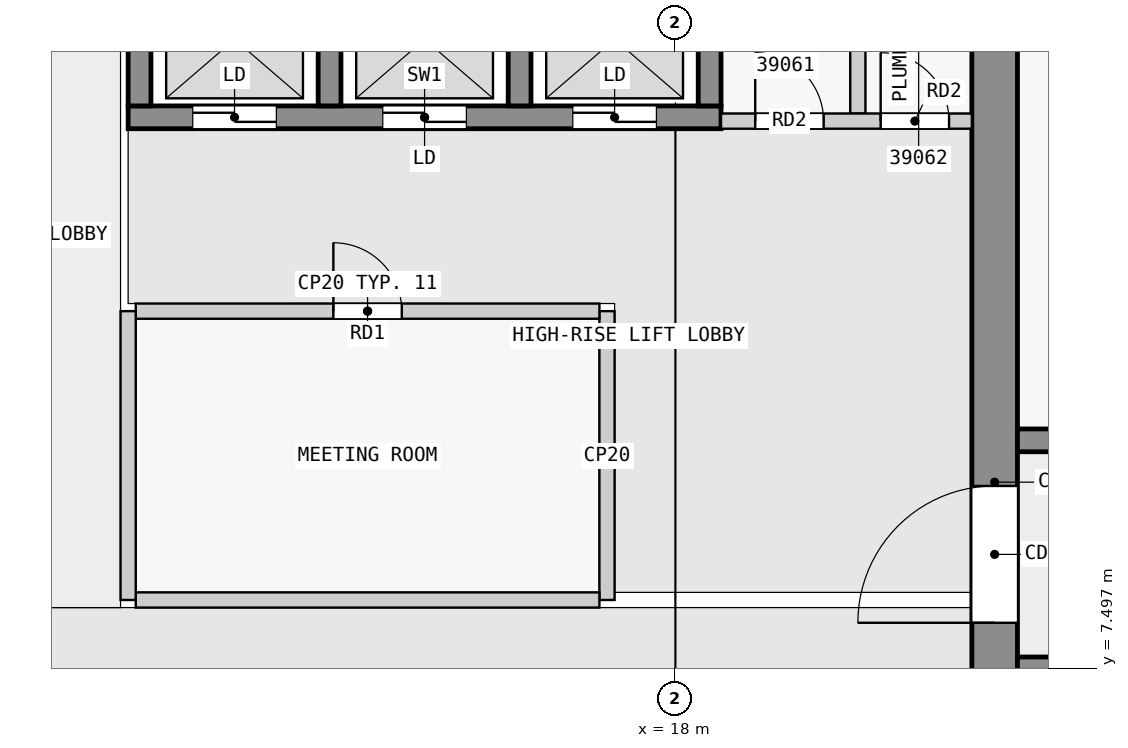
"""IFC4 building model, lengths in metres.
Left out: names, types, materials, properties, quantities, classifications, styles, units other than length and angle.
Written with IfcOpenShell. Run it as: python <this file> out.ifc"""

import sys

from ifc_helpers import new_model, si_unit, direction, frame, frame_2d, origin, place, context, subcontext, project, spatial, rectangle, extrude, element, fill, save


model = new_model("IFC4")
c1 = context("Model", 3, precision=1e-05, world=origin(), true_north=direction((0.0, 1.0)))
c2 = subcontext(c1, "Body", "Model", "MODEL_VIEW")
j1 = project(units=[si_unit("LENGTHUNIT", "METRE"), si_unit("PLANEANGLEUNIT", "RADIAN")], contexts=[c1])
p1 = place(None, origin())
s1 = spatial("IfcSite", under=j1, at=p1, CompositionType="ELEMENT")
p2 = place(p1, origin())
s2 = spatial("IfcBuilding", under=s1, at=p2, CompositionType="ELEMENT")
p3 = place(p2, frame((0.0, 0.0, 153.4)))
s3 = spatial("IfcBuildingStorey", under=s2, at=p3, CompositionType="ELEMENT", Elevation=153.4)
p4 = place(p3, frame((22.2, 2.5, 0.0), z_axis=(0.0, 0.0, 1.0), x_axis=(0.0, 1.0, 0.0)))
e1 = element("IfcWall", 1, at=p4, inside=s3, PredefinedType="SHEAR", context=c2, shape_type="SweptSolid", body=[
    extrude(rectangle(XDim=14.9, YDim=0.6, at=frame_2d((7.45, 0.0))), origin(), (0.0, 0.0, 1.0), 3.25),
])
p5 = place(p4, frame((5.6, 0.0, 0.0)))
e2 = element("IfcOpeningElement", 2, at=p5, cuts=e1, PredefinedType="OPENING", context=c2, shape_type="SweptSolid", body=[
    extrude(rectangle(XDim=1.8, YDim=2.1, at=frame_2d((0.9, 1.05))), frame((0.0, 0.31, 0.0), z_axis=(0.0, -1.0, 0.0), x_axis=(1.0, 0.0, 0.0)), (0.0, 0.0, 1.0), 0.62),
])
p6 = place(p3, frame((10.8, 14.75, 0.0), z_axis=(0.0, 0.0, 1.0), x_axis=(1.0, 0.0, 0.0)))
e3 = element("IfcWall", 3, at=p6, inside=s3, PredefinedType="SHEAR", context=c2, shape_type="SweptSolid", body=[
    extrude(rectangle(XDim=7.8, YDim=0.3, at=frame_2d((3.9, 0.0))), origin(), (0.0, 0.0, 1.0), 3.25),
])
p7 = place(p6, frame((0.85, 0.0, 0.0)))
e4 = element("IfcOpeningElement", 4, at=p7, cuts=e3, PredefinedType="OPENING", context=c2, shape_type="SweptSolid", body=[
    extrude(rectangle(XDim=1.1, YDim=2.1, at=frame_2d((0.55, 1.05))), frame((0.0, 0.16, 0.0), z_axis=(0.0, -1.0, 0.0), x_axis=(1.0, 0.0, 0.0)), (0.0, 0.0, 1.0), 0.32),
])
p8 = place(p6, frame((3.35, 0.0, 0.0)))
e5 = element("IfcOpeningElement", 5, at=p8, cuts=e3, PredefinedType="OPENING", context=c2, shape_type="SweptSolid", body=[
    extrude(rectangle(XDim=1.1, YDim=2.1, at=frame_2d((0.55, 1.05))), frame((0.0, 0.16, 0.0), z_axis=(0.0, -1.0, 0.0), x_axis=(1.0, 0.0, 0.0)), (0.0, 0.0, 1.0), 0.32),
])
p9 = place(p6, frame((5.85, 0.0, 0.0)))
e6 = element("IfcOpeningElement", 6, at=p9, cuts=e3, PredefinedType="OPENING", context=c2, shape_type="SweptSolid", body=[
    extrude(rectangle(XDim=1.1, YDim=2.1, at=frame_2d((0.55, 1.05))), frame((0.0, 0.16, 0.0), z_axis=(0.0, -1.0, 0.0), x_axis=(1.0, 0.0, 0.0)), (0.0, 0.0, 1.0), 0.32),
])
for number, where, z_axis, x_axis in (
    (7, (10.95, 14.9, 0.0), (0.0, 0.0, 1.0), (0.0, 1.0, 0.0)),
    (8, (13.45, 14.9, 0.0), (0.0, 0.0, 1.0), (0.0, 1.0, 0.0)),
    (9, (15.95, 14.9, 0.0), (0.0, 0.0, 1.0), (0.0, 1.0, 0.0)),
    (10, (18.45, 14.9, 0.0), (0.0, 0.0, 1.0), (0.0, 1.0, 0.0)),
):
    element("IfcWall", number, at=place(p3, frame(where, z_axis=z_axis, x_axis=x_axis)), inside=s3, PredefinedType="SHEAR", context=c2, shape_type="SweptSolid", body=[
        extrude(rectangle(XDim=2.0, YDim=0.3, at=frame_2d((1.0, 0.0))), origin(), (0.0, 0.0, 1.0), 3.25),
    ])
p10 = place(p3, frame((22.5, 7.5, 0.0), z_axis=(0.0, 0.0, 1.0), x_axis=(1.0, 0.0, 0.0)))
e11 = element("IfcWall", 11, at=p10, inside=s3, PredefinedType="SHEAR", context=c2, shape_type="SweptSolid", body=[
    extrude(rectangle(XDim=22.5, YDim=0.3, at=frame_2d((11.25, 0.0))), origin(), (0.0, 0.0, 1.0), 3.25),
])
p11 = place(p10, frame((4.05, 0.0, 0.0)))
e12 = element("IfcOpeningElement", 12, at=p11, cuts=e11, PredefinedType="OPENING", context=c2, shape_type="SweptSolid", body=[
    extrude(rectangle(XDim=1.0, YDim=2.1, at=frame_2d((0.5, 1.05))), frame((0.0, 0.16, 0.0), z_axis=(0.0, -1.0, 0.0), x_axis=(1.0, 0.0, 0.0)), (0.0, 0.0, 1.0), 0.32),
])
p12 = place(p10, frame((10.35, 0.0, 0.0)))
e13 = element("IfcOpeningElement", 13, at=p12, cuts=e11, PredefinedType="OPENING", context=c2, shape_type="SweptSolid", body=[
    extrude(rectangle(XDim=1.8, YDim=2.1, at=frame_2d((0.9, 1.05))), frame((0.0, 0.16, 0.0), z_axis=(0.0, -1.0, 0.0), x_axis=(1.0, 0.0, 0.0)), (0.0, 0.0, 1.0), 0.32),
])
p13 = place(p10, frame((16.85, 0.0, 0.0)))
e14 = element("IfcOpeningElement", 14, at=p13, cuts=e11, PredefinedType="OPENING", context=c2, shape_type="SweptSolid", body=[
    extrude(rectangle(XDim=1.0, YDim=2.1, at=frame_2d((0.5, 1.05))), frame((0.0, 0.16, 0.0), z_axis=(0.0, -1.0, 0.0), x_axis=(1.0, 0.0, 0.0)), (0.0, 0.0, 1.0), 0.32),
])
p14 = place(p3, frame((22.5, 10.5, 0.0), z_axis=(0.0, 0.0, 1.0), x_axis=(1.0, 0.0, 0.0)))
e15 = element("IfcWall", 15, at=p14, inside=s3, PredefinedType="SHEAR", context=c2, shape_type="SweptSolid", body=[
    extrude(rectangle(XDim=22.5, YDim=0.3, at=frame_2d((11.25, 0.0))), origin(), (0.0, 0.0, 1.0), 3.25),
])
p15 = place(p14, frame((4.05, 0.0, 0.0)))
e16 = element("IfcOpeningElement", 16, at=p15, cuts=e15, PredefinedType="OPENING", context=c2, shape_type="SweptSolid", body=[
    extrude(rectangle(XDim=1.0, YDim=2.1, at=frame_2d((0.5, 1.05))), frame((0.0, 0.16, 0.0), z_axis=(0.0, -1.0, 0.0), x_axis=(1.0, 0.0, 0.0)), (0.0, 0.0, 1.0), 0.32),
])
p16 = place(p14, frame((11.65, 0.0, 0.0)))
e17 = element("IfcOpeningElement", 17, at=p16, cuts=e15, PredefinedType="OPENING", context=c2, shape_type="SweptSolid", body=[
    extrude(rectangle(XDim=1.0, YDim=2.1, at=frame_2d((0.5, 1.05))), frame((0.0, 0.16, 0.0), z_axis=(0.0, -1.0, 0.0), x_axis=(1.0, 0.0, 0.0)), (0.0, 0.0, 1.0), 0.32),
])
p17 = place(p14, frame((18.75, 0.0, 0.0)))
e18 = element("IfcOpeningElement", 18, at=p17, cuts=e15, PredefinedType="OPENING", context=c2, shape_type="SweptSolid", body=[
    extrude(rectangle(XDim=0.9, YDim=2.1, at=frame_2d((0.45, 1.05))), frame((0.0, 0.16, 0.0), z_axis=(0.0, -1.0, 0.0), x_axis=(1.0, 0.0, 0.0)), (0.0, 0.0, 1.0), 0.32),
])
p18 = place(p14, frame((20.95, 0.0, 0.0)))
e19 = element("IfcOpeningElement", 19, at=p18, cuts=e15, PredefinedType="OPENING", context=c2, shape_type="SweptSolid", body=[
    extrude(rectangle(XDim=1.0, YDim=2.1, at=frame_2d((0.5, 1.05))), frame((0.0, 0.16, 0.0), z_axis=(0.0, -1.0, 0.0), x_axis=(1.0, 0.0, 0.0)), (0.0, 0.0, 1.0), 0.32),
])
p19 = place(p3, frame((10.8, 8.4, 0.0), z_axis=(0.0, 0.0, 1.0), x_axis=(0.0, 1.0, 0.0)))
e20 = element("IfcWall", 20, at=p19, inside=s3, PredefinedType="PARTITIONING", context=c2, shape_type="SweptSolid", body=[
    extrude(rectangle(XDim=3.8, YDim=0.2, at=frame_2d((1.9, 0.0))), origin(), (0.0, 0.0, 1.0), 3.25),
])
p20 = place(p3, frame((10.9, 8.4, 0.0), z_axis=(0.0, 0.0, 1.0), x_axis=(1.0, 0.0, 0.0)))
e21 = element("IfcWall", 21, at=p20, inside=s3, PredefinedType="PARTITIONING", context=c2, shape_type="SweptSolid", body=[
    extrude(rectangle(XDim=6.1, YDim=0.2, at=frame_2d((3.05, 0.0))), origin(), (0.0, 0.0, 1.0), 3.25),
])
p21 = place(p3, frame((17.1, 8.4, 0.0), z_axis=(0.0, 0.0, 1.0), x_axis=(0.0, 1.0, 0.0)))
e22 = element("IfcWall", 22, at=p21, inside=s3, PredefinedType="PARTITIONING", context=c2, shape_type="SweptSolid", body=[
    extrude(rectangle(XDim=3.8, YDim=0.2, at=frame_2d((1.9, 0.0))), origin(), (0.0, 0.0, 1.0), 3.25),
])
p22 = place(p3, frame((10.9, 12.2, 0.0), z_axis=(0.0, 0.0, 1.0), x_axis=(1.0, 0.0, 0.0)))
e23 = element("IfcWall", 23, at=p22, inside=s3, PredefinedType="PARTITIONING", context=c2, shape_type="SweptSolid", body=[
    extrude(rectangle(XDim=6.1, YDim=0.2, at=frame_2d((3.05, 0.0))), origin(), (0.0, 0.0, 1.0), 3.25),
])
p23 = place(p22, frame((2.6, 0.0, 0.0)))
e24 = element("IfcOpeningElement", 24, at=p23, cuts=e23, PredefinedType="OPENING", context=c2, shape_type="SweptSolid", body=[
    extrude(rectangle(XDim=0.9, YDim=2.1, at=frame_2d((0.45, 1.05))), frame((0.0, 0.11, 0.0), z_axis=(0.0, -1.0, 0.0), x_axis=(1.0, 0.0, 0.0)), (0.0, 0.0, 1.0), 0.22),
])
p24 = place(p3, frame((18.6, 14.7, 0.0), z_axis=(0.0, 0.0, 1.0), x_axis=(1.0, 0.0, 0.0)))
e25 = element("IfcWall", 25, at=p24, inside=s3, PredefinedType="PARTITIONING", context=c2, shape_type="SweptSolid", body=[
    extrude(rectangle(XDim=3.3, YDim=0.2, at=frame_2d((1.65, 0.0))), origin(), (0.0, 0.0, 1.0), 3.25),
])
p25 = place(p24, frame((0.45, 0.0, 0.0)))
e26 = element("IfcOpeningElement", 26, at=p25, cuts=e25, PredefinedType="OPENING", context=c2, shape_type="SweptSolid", body=[
    extrude(rectangle(XDim=0.9, YDim=2.1, at=frame_2d((0.45, 1.05))), frame((0.0, 0.11, 0.0), z_axis=(0.0, -1.0, 0.0), x_axis=(1.0, 0.0, 0.0)), (0.0, 0.0, 1.0), 0.22),
])
p26 = place(p24, frame((2.1, 0.0, 0.0)))
e27 = element("IfcOpeningElement", 27, at=p26, cuts=e25, PredefinedType="OPENING", context=c2, shape_type="SweptSolid", body=[
    extrude(rectangle(XDim=0.9, YDim=2.1, at=frame_2d((0.45, 1.05))), frame((0.0, 0.11, 0.0), z_axis=(0.0, -1.0, 0.0), x_axis=(1.0, 0.0, 0.0)), (0.0, 0.0, 1.0), 0.22),
])
p27 = place(p3, frame((20.4, 14.8, 0.0), z_axis=(0.0, 0.0, 1.0), x_axis=(0.0, 1.0, 0.0)))
e28 = element("IfcWall", 28, at=p27, inside=s3, PredefinedType="PARTITIONING", context=c2, shape_type="SweptSolid", body=[
    extrude(rectangle(XDim=2.6, YDim=0.2, at=frame_2d((1.3, 0.0))), origin(), (0.0, 0.0, 1.0), 3.25),
])
p28 = place(p23, origin())
e29 = element("IfcDoor", 29, at=p28, inside=s3, OperationType="SINGLE_SWING_LEFT", PredefinedType="DOOR", context=c2, shape_type="SweptSolid", body=[
    extrude(rectangle(XDim=0.9, YDim=2.1, at=frame_2d((0.45, 1.05))), frame((0.0, 0.025, 0.0), z_axis=(0.0, -1.0, 0.0), x_axis=(1.0, 0.0, 0.0)), (0.0, 0.0, 1.0), 0.05),
])
fill(e24, e29)
p29 = place(p7, origin())
e30 = element("IfcDoor", 30, at=p29, inside=s3, OperationType="DOUBLE_DOOR_SLIDING", PredefinedType="DOOR", context=c2, shape_type="SweptSolid", body=[
    extrude(rectangle(XDim=1.1, YDim=2.1, at=frame_2d((0.55, 1.05))), frame((0.0, 0.025, 0.0), z_axis=(0.0, -1.0, 0.0), x_axis=(1.0, 0.0, 0.0)), (0.0, 0.0, 1.0), 0.05),
])
fill(e4, e30)
p30 = place(p8, origin())
e31 = element("IfcDoor", 31, at=p30, inside=s3, OperationType="DOUBLE_DOOR_SLIDING", PredefinedType="DOOR", context=c2, shape_type="SweptSolid", body=[
    extrude(rectangle(XDim=1.1, YDim=2.1, at=frame_2d((0.55, 1.05))), frame((0.0, 0.025, 0.0), z_axis=(0.0, -1.0, 0.0), x_axis=(1.0, 0.0, 0.0)), (0.0, 0.0, 1.0), 0.05),
])
fill(e5, e31)
p31 = place(p9, origin())
e32 = element("IfcDoor", 32, at=p31, inside=s3, OperationType="DOUBLE_DOOR_SLIDING", PredefinedType="DOOR", context=c2, shape_type="SweptSolid", body=[
    extrude(rectangle(XDim=1.1, YDim=2.1, at=frame_2d((0.55, 1.05))), frame((0.0, 0.025, 0.0), z_axis=(0.0, -1.0, 0.0), x_axis=(1.0, 0.0, 0.0)), (0.0, 0.0, 1.0), 0.05),
])
fill(e6, e32)
p32 = place(p5, origin())
e33 = element("IfcDoor", 33, at=p32, inside=s3, OperationType="DOUBLE_DOOR_SINGLE_SWING", PredefinedType="DOOR", context=c2, shape_type="SweptSolid", body=[
    extrude(rectangle(XDim=1.8, YDim=2.1, at=frame_2d((0.9, 1.05))), frame((0.0, 0.025, 0.0), z_axis=(0.0, -1.0, 0.0), x_axis=(1.0, 0.0, 0.0)), (0.0, 0.0, 1.0), 0.05),
])
fill(e2, e33)
p33 = place(p25, origin())
e34 = element("IfcDoor", 34, at=p33, inside=s3, OperationType="SINGLE_SWING_LEFT", PredefinedType="DOOR", context=c2, shape_type="SweptSolid", body=[
    extrude(rectangle(XDim=0.9, YDim=2.1, at=frame_2d((0.45, 1.05))), frame((0.0, 0.025, 0.0), z_axis=(0.0, -1.0, 0.0), x_axis=(1.0, 0.0, 0.0)), (0.0, 0.0, 1.0), 0.05),
])
fill(e26, e34)
p34 = place(p26, origin())
e35 = element("IfcDoor", 35, at=p34, inside=s3, OperationType="SINGLE_SWING_LEFT", PredefinedType="DOOR", context=c2, shape_type="SweptSolid", body=[
    extrude(rectangle(XDim=0.9, YDim=2.1, at=frame_2d((0.45, 1.05))), frame((0.0, 0.025, 0.0), z_axis=(0.0, -1.0, 0.0), x_axis=(1.0, 0.0, 0.0)), (0.0, 0.0, 1.0), 0.05),
])
fill(e27, e35)
save(model, sys.argv[1])
